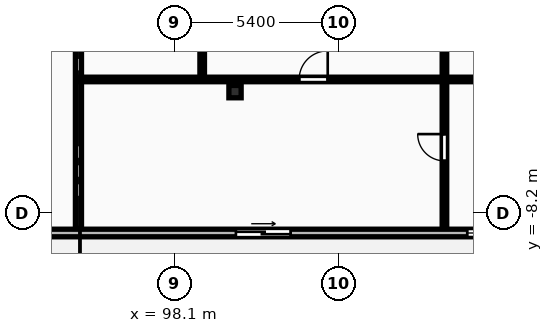
"""IFC4 building model, lengths in metres.
Left out: names, types, materials, properties, quantities, classifications, styles, units other than length and angle.
Written with IfcOpenShell. Run it as: python <this file> out.ifc"""

import sys

from ifc_helpers import new_model, si_unit, direction, frame, frame_2d, origin, origin_2d, place, context, subcontext, project, spatial, rectangle, i_section, extrude, element, fill, save


model = new_model("IFC4")
c1 = context("Model", 3, precision=1e-05, world=origin(), true_north=direction((0.0, 1.0)))
c2 = subcontext(c1, "Body", "Model", "MODEL_VIEW")
j1 = project(units=[si_unit("LENGTHUNIT", "METRE"), si_unit("PLANEANGLEUNIT", "RADIAN")], contexts=[c1])
p1 = place(None, origin())
s1 = spatial("IfcSite", under=j1, at=p1, CompositionType="ELEMENT")
p2 = place(p1, origin())
s2 = spatial("IfcBuilding", under=s1, at=p2, CompositionType="ELEMENT")
p3 = place(p2, frame((0.0, 0.0, 146.5)))
s3 = spatial("IfcBuildingStorey", under=s2, at=p3, CompositionType="ELEMENT", Elevation=146.5)
p4 = place(p3, frame((100.1, -4.2, 0.0), z_axis=(0.0, 0.0, 1.0), x_axis=(1.0, 0.0, 0.0)))
e1 = element("IfcColumn", 1, at=p4, inside=s3, PredefinedType="COLUMN", context=c2, shape_type="SweptSolid", body=[
    extrude(i_section(OverallWidth=0.403, OverallDepth=0.406, WebThickness=0.027, FlangeThickness=0.043, FilletRadius=0.015, at=origin_2d()), origin(), (0.0, 0.0, 1.0), 3.6),
])
p5 = place(p3, frame((72.7, -8.85, 0.0), z_axis=(0.0, 0.0, 1.0), x_axis=(1.0, 0.0, 0.0)))
e2 = element("IfcWall", 2, at=p5, inside=s3, PredefinedType="STANDARD", context=c2, shape_type="SweptSolid", body=[
    extrude(rectangle(XDim=58.0, YDim=0.25, at=frame_2d((29.0, 0.0))), origin(), (0.0, 0.0, 1.0), 3.31),
])
p6 = place(p5, frame((6.835, 0.0, 0.85)))
e3 = element("IfcOpeningElement", 3, at=p6, cuts=e2, PredefinedType="OPENING", context=c2, shape_type="SweptSolid", body=[
    extrude(rectangle(XDim=2.4, YDim=1.9, at=frame_2d((1.2, 0.95))), frame((0.0, 0.135, 0.0), z_axis=(0.0, -1.0, 0.0), x_axis=(1.0, 0.0, 0.0)), (0.0, 0.0, 1.0), 0.27),
])
p7 = place(p5, frame((12.7, 0.0, 0.85)))
e4 = element("IfcOpeningElement", 4, at=p7, cuts=e2, PredefinedType="OPENING", context=c2, shape_type="SweptSolid", body=[
    extrude(rectangle(XDim=2.4, YDim=1.9, at=frame_2d((1.2, 0.95))), frame((0.0, 0.135, 0.0), z_axis=(0.0, -1.0, 0.0), x_axis=(1.0, 0.0, 0.0)), (0.0, 0.0, 1.0), 0.27),
])
p8 = place(p5, frame((1.555, 0.0, 0.0)))
e5 = element("IfcOpeningElement", 5, at=p8, cuts=e2, PredefinedType="OPENING", context=c2, shape_type="SweptSolid", body=[
    extrude(rectangle(XDim=1.8, YDim=2.2, at=frame_2d((0.9, 1.1))), frame((0.0, 0.135, 0.0), z_axis=(0.0, -1.0, 0.0), x_axis=(1.0, 0.0, 0.0)), (0.0, 0.0, 1.0), 0.27),
])
p9 = place(p5, frame((18.125, 0.0, 0.85)))
e6 = element("IfcOpeningElement", 6, at=p9, cuts=e2, PredefinedType="OPENING", context=c2, shape_type="SweptSolid", body=[
    extrude(rectangle(XDim=2.4, YDim=1.9, at=frame_2d((1.2, 0.95))), frame((0.0, 0.135, 0.0), z_axis=(0.0, -1.0, 0.0), x_axis=(1.0, 0.0, 0.0)), (0.0, 0.0, 1.0), 0.27),
])
p10 = place(p5, frame((27.429, 0.0, 0.0)))
e7 = element("IfcOpeningElement", 7, at=p10, cuts=e2, PredefinedType="OPENING", context=c2, shape_type="SweptSolid", body=[
    extrude(rectangle(XDim=1.8, YDim=2.2, at=frame_2d((0.9, 1.1))), frame((0.0, 0.135, 0.0), z_axis=(0.0, -1.0, 0.0), x_axis=(1.0, 0.0, 0.0)), (0.0, 0.0, 1.0), 0.27),
])
p11 = place(p5, frame((35.038, 0.0, 0.85)))
e8 = element("IfcOpeningElement", 8, at=p11, cuts=e2, PredefinedType="OPENING", context=c2, shape_type="SweptSolid", body=[
    extrude(rectangle(XDim=1.8, YDim=1.8, at=frame_2d((0.9, 0.9))), frame((0.0, 0.135, 0.0), z_axis=(0.0, -1.0, 0.0), x_axis=(1.0, 0.0, 0.0)), (0.0, 0.0, 1.0), 0.27),
])
p12 = place(p5, frame((43.541, 0.0, 0.85)))
e9 = element("IfcOpeningElement", 9, at=p12, cuts=e2, PredefinedType="OPENING", context=c2, shape_type="SweptSolid", body=[
    extrude(rectangle(XDim=2.4, YDim=1.9, at=frame_2d((1.2, 0.95))), frame((0.0, 0.135, 0.0), z_axis=(0.0, -1.0, 0.0), x_axis=(1.0, 0.0, 0.0)), (0.0, 0.0, 1.0), 0.27),
])
p13 = place(p5, frame((49.117, 0.0, 0.85)))
e10 = element("IfcOpeningElement", 10, at=p13, cuts=e2, PredefinedType="OPENING", context=c2, shape_type="SweptSolid", body=[
    extrude(rectangle(XDim=2.4, YDim=1.9, at=frame_2d((1.2, 0.95))), frame((0.0, 0.135, 0.0), z_axis=(0.0, -1.0, 0.0), x_axis=(1.0, 0.0, 0.0)), (0.0, 0.0, 1.0), 0.27),
])
p14 = place(p5, frame((39.053, 0.0, 0.0)))
e11 = element("IfcOpeningElement", 11, at=p14, cuts=e2, PredefinedType="OPENING", context=c2, shape_type="SweptSolid", body=[
    extrude(rectangle(XDim=1.8, YDim=2.2, at=frame_2d((0.9, 1.1))), frame((0.0, 0.135, 0.0), z_axis=(0.0, -1.0, 0.0), x_axis=(1.0, 0.0, 0.0)), (0.0, 0.0, 1.0), 0.27),
])
p15 = place(p5, frame((54.355, 0.0, 0.85)))
e12 = element("IfcOpeningElement", 12, at=p15, cuts=e2, PredefinedType="OPENING", context=c2, shape_type="SweptSolid", body=[
    extrude(rectangle(XDim=2.4, YDim=1.9, at=frame_2d((1.2, 0.95))), frame((0.0, 0.135, 0.0), z_axis=(0.0, -1.0, 0.0), x_axis=(1.0, 0.0, 0.0)), (0.0, 0.0, 1.0), 0.27),
])
p16 = place(p3, frame((94.95, -8.7, 0.0), z_axis=(0.0, 0.0, 1.0), x_axis=(0.0, 1.0, 0.0)))
e13 = element("IfcWall", 13, at=p16, inside=s3, PredefinedType="PARTITIONING", context=c2, shape_type="SweptSolid", body=[
    extrude(rectangle(XDim=24.57, YDim=0.2, at=frame_2d((12.285, 0.0))), origin(), (0.0, 0.0, 1.0), 3.31),
])
p17 = place(p3, frame((99.02, -3.74, 0.0), z_axis=(0.0, 0.0, 1.0), x_axis=(0.0, 1.0, 0.0)))
e14 = element("IfcWall", 14, at=p17, inside=s3, PredefinedType="PARTITIONING", context=c2, shape_type="SweptSolid", body=[
    extrude(rectangle(XDim=5.0, YDim=0.15, at=frame_2d((2.5, 0.0))), origin(), (0.0, 0.0, 1.0), 3.31),
])
p18 = place(p17, frame((2.06, 0.0, 0.0)))
e15 = element("IfcOpeningElement", 15, at=p18, cuts=e14, PredefinedType="OPENING", context=c2, shape_type="SweptSolid", body=[
    extrude(rectangle(XDim=0.88, YDim=2.06, at=frame_2d((0.44, 1.03))), frame((0.0, 0.085, 0.0), z_axis=(0.0, -1.0, 0.0), x_axis=(1.0, 0.0, 0.0)), (0.0, 0.0, 1.0), 0.17),
])
p19 = place(p3, frame((106.988, -8.7, 0.0), z_axis=(0.0, 0.0, 1.0), x_axis=(0.0, 1.0, 0.0)))
e16 = element("IfcWall", 16, at=p19, inside=s3, PredefinedType="PARTITIONING", context=c2, shape_type="SweptSolid", body=[
    extrude(rectangle(XDim=9.96, YDim=0.15, at=frame_2d((4.98, 0.0))), origin(), (0.0, 0.0, 1.0), 3.31),
])
p20 = place(p19, frame((5.894, 0.0, 0.0)))
e17 = element("IfcOpeningElement", 17, at=p20, cuts=e16, PredefinedType="OPENING", context=c2, shape_type="SweptSolid", body=[
    extrude(rectangle(XDim=0.84, YDim=2.04, at=frame_2d((0.42, 1.02))), frame((0.0, 0.085, 0.0), z_axis=(0.0, -1.0, 0.0), x_axis=(1.0, 0.0, 0.0)), (0.0, 0.0, 1.0), 0.17),
])
p21 = place(p19, frame((7.69, 0.0, 0.0)))
e18 = element("IfcOpeningElement", 18, at=p21, cuts=e16, PredefinedType="OPENING", context=c2, shape_type="SweptSolid", body=[
    extrude(rectangle(XDim=0.84, YDim=2.04, at=frame_2d((0.42, 1.02))), frame((0.0, 0.085, 0.0), z_axis=(0.0, -1.0, 0.0), x_axis=(1.0, 0.0, 0.0)), (0.0, 0.0, 1.0), 0.17),
])
p22 = place(p19, frame((2.223, 0.0, 0.0)))
e19 = element("IfcOpeningElement", 19, at=p22, cuts=e16, PredefinedType="OPENING", context=c2, shape_type="SweptSolid", body=[
    extrude(rectangle(XDim=0.88, YDim=2.06, at=frame_2d((0.44, 1.03))), frame((0.0, 0.085, 0.0), z_axis=(0.0, -1.0, 0.0), x_axis=(1.0, 0.0, 0.0)), (0.0, 0.0, 1.0), 0.17),
])
p23 = place(p3, frame((95.03, -3.8, 0.0), z_axis=(0.0, 0.0, 1.0), x_axis=(1.0, 0.0, 0.0)))
e20 = element("IfcWall", 20, at=p23, inside=s3, PredefinedType="PARTITIONING", context=c2, shape_type="SweptSolid", body=[
    extrude(rectangle(XDim=15.298, YDim=0.15, at=frame_2d((7.649, 0.0))), origin(), (0.0, 0.0, 1.0), 3.31),
])
p24 = place(p23, frame((7.179, 0.0, 0.0)))
e21 = element("IfcOpeningElement", 21, at=p24, cuts=e20, PredefinedType="OPENING", context=c2, shape_type="SweptSolid", body=[
    extrude(rectangle(XDim=0.94, YDim=2.1, at=frame_2d((0.47, 1.05))), frame((0.0, 0.085, 0.0), z_axis=(0.0, -1.0, 0.0), x_axis=(1.0, 0.0, 0.0)), (0.0, 0.0, 1.0), 0.17),
])
p25 = place(p10, origin())
e22 = element("IfcDoor", 22, at=p25, inside=s3, OperationType="SLIDING_TO_RIGHT", PredefinedType="DOOR", context=c2, shape_type="SweptSolid", body=[
    extrude(rectangle(XDim=1.8, YDim=2.2, at=frame_2d((0.9, 1.1))), frame((0.0, 0.025, 0.0), z_axis=(0.0, -1.0, 0.0), x_axis=(1.0, 0.0, 0.0)), (0.0, 0.0, 1.0), 0.05),
])
fill(e7, e22)
p26 = place(p11, origin())
e23 = element("IfcWindow", 23, at=p26, inside=s3, PartitioningType="SINGLE_PANEL", PredefinedType="WINDOW", context=c2, shape_type="SweptSolid", body=[
    extrude(rectangle(XDim=1.8, YDim=1.8, at=frame_2d((0.9, 0.9))), frame((0.0, 0.03, 0.0), z_axis=(0.0, -1.0, 0.0), x_axis=(1.0, 0.0, 0.0)), (0.0, 0.0, 1.0), 0.06),
])
fill(e8, e23)
p27 = place(p22, origin())
e24 = element("IfcDoor", 24, at=p27, inside=s3, OperationType="SINGLE_SWING_RIGHT", PredefinedType="DOOR", context=c2, shape_type="SweptSolid", body=[
    extrude(rectangle(XDim=0.88, YDim=2.06, at=frame_2d((0.44, 1.03))), frame((0.0, 0.025, 0.0), z_axis=(0.0, -1.0, 0.0), x_axis=(1.0, 0.0, 0.0)), (0.0, 0.0, 1.0), 0.05),
])
fill(e19, e24)
p28 = place(p24, origin())
e25 = element("IfcDoor", 25, at=p28, inside=s3, OperationType="SINGLE_SWING_RIGHT", PredefinedType="DOOR", context=c2, shape_type="SweptSolid", body=[
    extrude(rectangle(XDim=0.94, YDim=2.1, at=frame_2d((0.47, 1.05))), frame((0.0, 0.025, 0.0), z_axis=(0.0, -1.0, 0.0), x_axis=(1.0, 0.0, 0.0)), (0.0, 0.0, 1.0), 0.05),
])
fill(e21, e25)
save(model, sys.argv[1])
